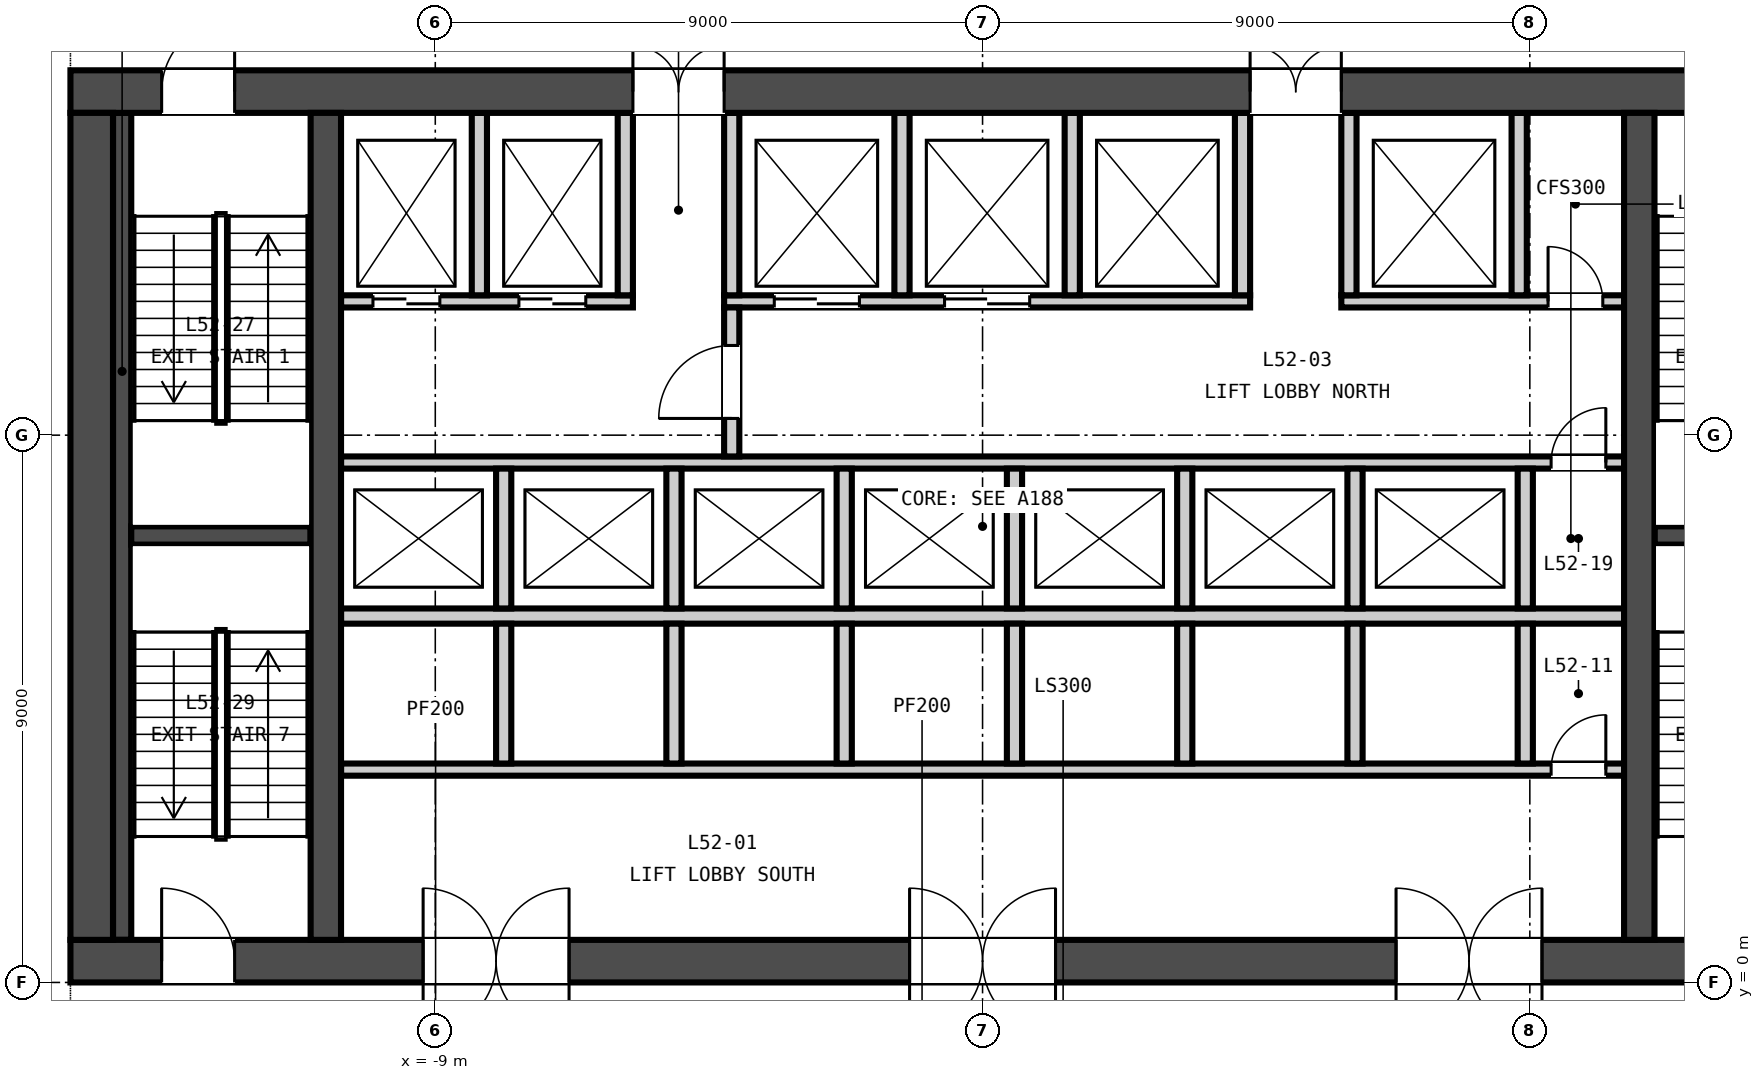
"""IFC4 building model, lengths in metres.
Left out: names, types, materials, properties, quantities, classifications, styles, units other than length and angle.
Written with IfcOpenShell. Run it as: python <this file> out.ifc"""

import sys

from ifc_helpers import new_model, si_unit, direction, frame, frame_2d, origin, place, context, subcontext, project, spatial, rectangle, extrude, element, fill, save


model = new_model("IFC4")
c1 = context("Model", 3, precision=1e-05, world=origin(), true_north=direction((0.0, 1.0)))
c2 = subcontext(c1, "Body", "Model", "MODEL_VIEW")
j1 = project(units=[si_unit("LENGTHUNIT", "METRE"), si_unit("PLANEANGLEUNIT", "RADIAN")], contexts=[c1])
p1 = place(None, origin())
s1 = spatial("IfcSite", under=j1, at=p1, CompositionType="ELEMENT")
p2 = place(p1, origin())
s2 = spatial("IfcBuilding", under=s1, at=p2, CompositionType="ELEMENT")
p3 = place(p2, frame((0.0, 0.0, 207.3)))
s3 = spatial("IfcBuildingStorey", under=s2, at=p3, CompositionType="ELEMENT", Elevation=207.3)
p4 = place(p3, frame((-15.0, 0.35, -0.3), z_axis=(0.0, 0.0, 1.0), x_axis=(1.0, 0.0, 0.0)))
e1 = element("IfcWall", 1, at=p4, inside=s3, PredefinedType="SOLIDWALL", context=c2, shape_type="SweptSolid", body=[
    extrude(rectangle(XDim=30.0, YDim=0.7, at=frame_2d((15.0, 0.0))), origin(), (0.0, 0.0, 1.0), 4.5),
])
p5 = place(p4, frame((5.8, 0.0, 0.3)))
e2 = element("IfcOpeningElement", 2, at=p5, cuts=e1, PredefinedType="OPENING", context=c2, shape_type="SweptSolid", body=[
    extrude(rectangle(XDim=2.4, YDim=2.4, at=frame_2d((1.2, 1.2))), frame((0.0, 0.36, 0.0), z_axis=(0.0, -1.0, 0.0), x_axis=(1.0, 0.0, 0.0)), (0.0, 0.0, 1.0), 0.72),
])
p6 = place(p4, frame((13.8, 0.0, 0.3)))
e3 = element("IfcOpeningElement", 3, at=p6, cuts=e1, PredefinedType="OPENING", context=c2, shape_type="SweptSolid", body=[
    extrude(rectangle(XDim=2.4, YDim=2.4, at=frame_2d((1.2, 1.2))), frame((0.0, 0.36, 0.0), z_axis=(0.0, -1.0, 0.0), x_axis=(1.0, 0.0, 0.0)), (0.0, 0.0, 1.0), 0.72),
])
p7 = place(p4, frame((21.8, 0.0, 0.3)))
e4 = element("IfcOpeningElement", 4, at=p7, cuts=e1, PredefinedType="OPENING", context=c2, shape_type="SweptSolid", body=[
    extrude(rectangle(XDim=2.4, YDim=2.4, at=frame_2d((1.2, 1.2))), frame((0.0, 0.36, 0.0), z_axis=(0.0, -1.0, 0.0), x_axis=(1.0, 0.0, 0.0)), (0.0, 0.0, 1.0), 0.72),
])
p8 = place(p4, frame((1.5, 0.0, 0.3)))
e5 = element("IfcOpeningElement", 5, at=p8, cuts=e1, PredefinedType="OPENING", context=c2, shape_type="SweptSolid", body=[
    extrude(rectangle(XDim=1.2, YDim=2.1, at=frame_2d((0.6, 1.05))), frame((0.0, 0.36, 0.0), z_axis=(0.0, -1.0, 0.0), x_axis=(1.0, 0.0, 0.0)), (0.0, 0.0, 1.0), 0.72),
])
p9 = place(p4, frame((27.3, 0.0, 0.3)))
e6 = element("IfcOpeningElement", 6, at=p9, cuts=e1, PredefinedType="OPENING", context=c2, shape_type="SweptSolid", body=[
    extrude(rectangle(XDim=1.2, YDim=2.1, at=frame_2d((0.6, 1.05))), frame((0.0, 0.36, 0.0), z_axis=(0.0, -1.0, 0.0), x_axis=(1.0, 0.0, 0.0)), (0.0, 0.0, 1.0), 0.72),
])
p10 = place(p3, frame((-15.0, 14.65, -0.3), z_axis=(0.0, 0.0, 1.0), x_axis=(1.0, 0.0, 0.0)))
e7 = element("IfcWall", 7, at=p10, inside=s3, PredefinedType="SOLIDWALL", context=c2, shape_type="SweptSolid", body=[
    extrude(rectangle(XDim=30.0, YDim=0.7, at=frame_2d((15.0, 0.0))), origin(), (0.0, 0.0, 1.0), 4.5),
])
p11 = place(p10, frame((9.25, 0.0, 0.3)))
e8 = element("IfcOpeningElement", 8, at=p11, cuts=e7, PredefinedType="OPENING", context=c2, shape_type="SweptSolid", body=[
    extrude(rectangle(XDim=1.5, YDim=2.1, at=frame_2d((0.75, 1.05))), frame((0.0, 0.36, 0.0), z_axis=(0.0, -1.0, 0.0), x_axis=(1.0, 0.0, 0.0)), (0.0, 0.0, 1.0), 0.72),
])
p12 = place(p10, frame((19.4, 0.0, 0.3)))
e9 = element("IfcOpeningElement", 9, at=p12, cuts=e7, PredefinedType="OPENING", context=c2, shape_type="SweptSolid", body=[
    extrude(rectangle(XDim=1.5, YDim=2.1, at=frame_2d((0.75, 1.05))), frame((0.0, 0.36, 0.0), z_axis=(0.0, -1.0, 0.0), x_axis=(1.0, 0.0, 0.0)), (0.0, 0.0, 1.0), 0.72),
])
p13 = place(p10, frame((1.5, 0.0, 0.3)))
e10 = element("IfcOpeningElement", 10, at=p13, cuts=e7, PredefinedType="OPENING", context=c2, shape_type="SweptSolid", body=[
    extrude(rectangle(XDim=1.2, YDim=2.1, at=frame_2d((0.6, 1.05))), frame((0.0, 0.36, 0.0), z_axis=(0.0, -1.0, 0.0), x_axis=(1.0, 0.0, 0.0)), (0.0, 0.0, 1.0), 0.72),
])
p14 = place(p10, frame((27.3, 0.0, 0.3)))
e11 = element("IfcOpeningElement", 11, at=p14, cuts=e7, PredefinedType="OPENING", context=c2, shape_type="SweptSolid", body=[
    extrude(rectangle(XDim=1.2, YDim=2.1, at=frame_2d((0.6, 1.05))), frame((0.0, 0.36, 0.0), z_axis=(0.0, -1.0, 0.0), x_axis=(1.0, 0.0, 0.0)), (0.0, 0.0, 1.0), 0.72),
])
p15 = place(p3, frame((-14.65, 0.7, -0.3), z_axis=(0.0, 0.0, 1.0), x_axis=(0.0, 1.0, 0.0)))
e12 = element("IfcWall", 12, at=p15, inside=s3, PredefinedType="SOLIDWALL", context=c2, shape_type="SweptSolid", body=[
    extrude(rectangle(XDim=13.6, YDim=0.7, at=frame_2d((6.8, 0.0))), origin(), (0.0, 0.0, 1.0), 4.5),
])
for number, where, z_axis, x_axis in (
    (13, (-10.8, 0.7, -0.3), (0.0, 0.0, 1.0), (0.0, 1.0, 0.0)),
    (14, (10.8, 0.7, -0.3), (0.0, 0.0, 1.0), (0.0, 1.0, 0.0)),
):
    element("IfcWall", number, at=place(p3, frame(where, z_axis=z_axis, x_axis=x_axis)), inside=s3, PredefinedType="SOLIDWALL", context=c2, shape_type="SweptSolid", body=[
        extrude(rectangle(XDim=13.6, YDim=0.5, at=frame_2d((6.8, 0.0))), origin(), (0.0, 0.0, 1.0), 4.5),
    ])
p16 = place(p3, frame((-10.55, 3.5, 0.0), z_axis=(0.0, 0.0, 1.0), x_axis=(1.0, 0.0, 0.0)))
e15 = element("IfcWall", 15, at=p16, inside=s3, PredefinedType="PARTITIONING", context=c2, shape_type="SweptSolid", body=[
    extrude(rectangle(XDim=21.1, YDim=0.2, at=frame_2d((10.55, 0.0))), origin(), (0.0, 0.0, 1.0), 4.2),
])
p17 = place(p16, frame((19.9, 0.0, 0.0)))
e16 = element("IfcOpeningElement", 16, at=p17, cuts=e15, PredefinedType="OPENING", context=c2, shape_type="SweptSolid", body=[
    extrude(rectangle(XDim=0.9, YDim=2.1, at=frame_2d((0.45, 1.05))), frame((0.0, 0.11, 0.0), z_axis=(0.0, -1.0, 0.0), x_axis=(1.0, 0.0, 0.0)), (0.0, 0.0, 1.0), 0.22),
])
p18 = place(p3, frame((-10.55, 6.025, 0.0), z_axis=(0.0, 0.0, 1.0), x_axis=(1.0, 0.0, 0.0)))
e17 = element("IfcWall", 17, at=p18, inside=s3, PredefinedType="PARTITIONING", context=c2, shape_type="SweptSolid", body=[
    extrude(rectangle(XDim=21.1, YDim=0.25, at=frame_2d((10.55, 0.0))), origin(), (0.0, 0.0, 1.0), 4.2),
])
p19 = place(p3, frame((-10.55, 8.55, 0.0), z_axis=(0.0, 0.0, 1.0), x_axis=(1.0, 0.0, 0.0)))
e18 = element("IfcWall", 18, at=p19, inside=s3, PredefinedType="PARTITIONING", context=c2, shape_type="SweptSolid", body=[
    extrude(rectangle(XDim=21.1, YDim=0.2, at=frame_2d((10.55, 0.0))), origin(), (0.0, 0.0, 1.0), 4.2),
])
p20 = place(p19, frame((19.9, 0.0, 0.0)))
e19 = element("IfcOpeningElement", 19, at=p20, cuts=e18, PredefinedType="OPENING", context=c2, shape_type="SweptSolid", body=[
    extrude(rectangle(XDim=0.9, YDim=2.1, at=frame_2d((0.45, 1.05))), frame((0.0, 0.11, 0.0), z_axis=(0.0, -1.0, 0.0), x_axis=(1.0, 0.0, 0.0)), (0.0, 0.0, 1.0), 0.22),
])
p21 = place(p3, frame((-10.55, 11.2, 0.0), z_axis=(0.0, 0.0, 1.0), x_axis=(1.0, 0.0, 0.0)))
e20 = element("IfcWall", 20, at=p21, inside=s3, PredefinedType="PARTITIONING", context=c2, shape_type="SweptSolid", body=[
    extrude(rectangle(XDim=4.8, YDim=0.2, at=frame_2d((2.4, 0.0))), origin(), (0.0, 0.0, 1.0), 4.2),
])
p22 = place(p21, frame((0.525, 0.0, 0.0)))
e21 = element("IfcOpeningElement", 21, at=p22, cuts=e20, PredefinedType="OPENING", context=c2, shape_type="SweptSolid", body=[
    extrude(rectangle(XDim=1.1, YDim=2.1, at=frame_2d((0.55, 1.05))), frame((0.0, 0.11, 0.0), z_axis=(0.0, -1.0, 0.0), x_axis=(1.0, 0.0, 0.0)), (0.0, 0.0, 1.0), 0.22),
])
p23 = place(p21, frame((2.925, 0.0, 0.0)))
e22 = element("IfcOpeningElement", 22, at=p23, cuts=e20, PredefinedType="OPENING", context=c2, shape_type="SweptSolid", body=[
    extrude(rectangle(XDim=1.1, YDim=2.1, at=frame_2d((0.55, 1.05))), frame((0.0, 0.11, 0.0), z_axis=(0.0, -1.0, 0.0), x_axis=(1.0, 0.0, 0.0)), (0.0, 0.0, 1.0), 0.22),
])
p24 = place(p3, frame((-4.25, 11.2, 0.0), z_axis=(0.0, 0.0, 1.0), x_axis=(1.0, 0.0, 0.0)))
e23 = element("IfcWall", 23, at=p24, inside=s3, PredefinedType="PARTITIONING", context=c2, shape_type="SweptSolid", body=[
    extrude(rectangle(XDim=8.65, YDim=0.2, at=frame_2d((4.325, 0.0))), origin(), (0.0, 0.0, 1.0), 4.2),
])
p25 = place(p24, frame((0.825, 0.0, 0.0)))
e24 = element("IfcOpeningElement", 24, at=p25, cuts=e23, PredefinedType="OPENING", context=c2, shape_type="SweptSolid", body=[
    extrude(rectangle(XDim=1.4, YDim=2.1, at=frame_2d((0.7, 1.05))), frame((0.0, 0.11, 0.0), z_axis=(0.0, -1.0, 0.0), x_axis=(1.0, 0.0, 0.0)), (0.0, 0.0, 1.0), 0.22),
])
p26 = place(p24, frame((3.625, 0.0, 0.0)))
e25 = element("IfcOpeningElement", 25, at=p26, cuts=e23, PredefinedType="OPENING", context=c2, shape_type="SweptSolid", body=[
    extrude(rectangle(XDim=1.4, YDim=2.1, at=frame_2d((0.7, 1.05))), frame((0.0, 0.11, 0.0), z_axis=(0.0, -1.0, 0.0), x_axis=(1.0, 0.0, 0.0)), (0.0, 0.0, 1.0), 0.22),
])
p27 = place(p3, frame((5.9, 11.2, 0.0), z_axis=(0.0, 0.0, 1.0), x_axis=(1.0, 0.0, 0.0)))
e26 = element("IfcWall", 26, at=p27, inside=s3, PredefinedType="PARTITIONING", context=c2, shape_type="SweptSolid", body=[
    extrude(rectangle(XDim=4.65, YDim=0.2, at=frame_2d((2.325, 0.0))), origin(), (0.0, 0.0, 1.0), 4.2),
])
p28 = place(p27, frame((3.4, 0.0, 0.0)))
e27 = element("IfcOpeningElement", 27, at=p28, cuts=e26, PredefinedType="OPENING", context=c2, shape_type="SweptSolid", body=[
    extrude(rectangle(XDim=0.9, YDim=2.1, at=frame_2d((0.45, 1.05))), frame((0.0, 0.11, 0.0), z_axis=(0.0, -1.0, 0.0), x_axis=(1.0, 0.0, 0.0)), (0.0, 0.0, 1.0), 0.22),
])
p29 = place(p3, frame((-4.125, 8.65, 0.0), z_axis=(0.0, 0.0, 1.0), x_axis=(0.0, 1.0, 0.0)))
e28 = element("IfcWall", 28, at=p29, inside=s3, PredefinedType="PARTITIONING", context=c2, shape_type="SweptSolid", body=[
    extrude(rectangle(XDim=2.45, YDim=0.25, at=frame_2d((1.225, 0.0))), origin(), (0.0, 0.0, 1.0), 4.2),
])
p30 = place(p29, frame((0.625, 0.0, 0.0)))
e29 = element("IfcOpeningElement", 29, at=p30, cuts=e28, PredefinedType="OPENING", context=c2, shape_type="SweptSolid", body=[
    extrude(rectangle(XDim=1.2, YDim=2.1, at=frame_2d((0.6, 1.05))), frame((0.0, 0.135, 0.0), z_axis=(0.0, -1.0, 0.0), x_axis=(1.0, 0.0, 0.0)), (0.0, 0.0, 1.0), 0.27),
])
for number, where, z_axis, x_axis in (
    (30, (-7.875, 3.6, 0.0), (0.0, 0.0, 1.0), (0.0, 1.0, 0.0)),
    (31, (-5.075, 3.6, 0.0), (0.0, 0.0, 1.0), (0.0, 1.0, 0.0)),
    (32, (-2.275, 3.6, 0.0), (0.0, 0.0, 1.0), (0.0, 1.0, 0.0)),
    (33, (0.525, 3.6, 0.0), (0.0, 0.0, 1.0), (0.0, 1.0, 0.0)),
    (34, (3.325, 3.6, 0.0), (0.0, 0.0, 1.0), (0.0, 1.0, 0.0)),
    (35, (6.125, 3.6, 0.0), (0.0, 0.0, 1.0), (0.0, 1.0, 0.0)),
    (36, (8.925, 3.6, 0.0), (0.0, 0.0, 1.0), (0.0, 1.0, 0.0)),
):
    element("IfcWall", number, at=place(p3, frame(where, z_axis=z_axis, x_axis=x_axis)), inside=s3, PredefinedType="PARTITIONING", context=c2, shape_type="SweptSolid", body=[
        extrude(rectangle(XDim=2.3, YDim=0.25, at=frame_2d((1.15, 0.0))), origin(), (0.0, 0.0, 1.0), 4.2),
    ])
for number, where, z_axis, x_axis in (
    (37, (-7.875, 6.15, 0.0), (0.0, 0.0, 1.0), (0.0, 1.0, 0.0)),
    (38, (-5.075, 6.15, 0.0), (0.0, 0.0, 1.0), (0.0, 1.0, 0.0)),
    (39, (-2.275, 6.15, 0.0), (0.0, 0.0, 1.0), (0.0, 1.0, 0.0)),
    (40, (0.525, 6.15, 0.0), (0.0, 0.0, 1.0), (0.0, 1.0, 0.0)),
    (41, (3.325, 6.15, 0.0), (0.0, 0.0, 1.0), (0.0, 1.0, 0.0)),
    (42, (6.125, 6.15, 0.0), (0.0, 0.0, 1.0), (0.0, 1.0, 0.0)),
    (43, (8.925, 6.15, 0.0), (0.0, 0.0, 1.0), (0.0, 1.0, 0.0)),
):
    element("IfcWall", number, at=place(p3, frame(where, z_axis=z_axis, x_axis=x_axis)), inside=s3, PredefinedType="PARTITIONING", context=c2, shape_type="SweptSolid", body=[
        extrude(rectangle(XDim=2.3, YDim=0.25, at=frame_2d((1.15, 0.0))), origin(), (0.0, 0.0, 1.0), 4.2),
    ])
for number, where, z_axis, x_axis in (
    (44, (-8.275, 11.3, 0.0), (0.0, 0.0, 1.0), (0.0, 1.0, 0.0)),
    (45, (-5.875, 11.3, 0.0), (0.0, 0.0, 1.0), (0.0, 1.0, 0.0)),
    (46, (-4.125, 11.3, 0.0), (0.0, 0.0, 1.0), (0.0, 1.0, 0.0)),
    (47, (-1.325, 11.3, 0.0), (0.0, 0.0, 1.0), (0.0, 1.0, 0.0)),
    (48, (1.475, 11.3, 0.0), (0.0, 0.0, 1.0), (0.0, 1.0, 0.0)),
    (49, (4.275, 11.3, 0.0), (0.0, 0.0, 1.0), (0.0, 1.0, 0.0)),
    (50, (6.025, 11.3, 0.0), (0.0, 0.0, 1.0), (0.0, 1.0, 0.0)),
    (51, (8.825, 11.3, 0.0), (0.0, 0.0, 1.0), (0.0, 1.0, 0.0)),
):
    element("IfcWall", number, at=place(p3, frame(where, z_axis=z_axis, x_axis=x_axis)), inside=s3, PredefinedType="PARTITIONING", context=c2, shape_type="SweptSolid", body=[
        extrude(rectangle(XDim=3.0, YDim=0.25, at=frame_2d((1.5, 0.0))), origin(), (0.0, 0.0, 1.0), 4.2),
    ])
p31 = place(p3, frame((-14.0, 7.35, 0.0), z_axis=(0.0, 0.0, 1.0), x_axis=(1.0, 0.0, 0.0)))
e52 = element("IfcWall", 52, at=p31, inside=s3, PredefinedType="SOLIDWALL", context=c2, shape_type="SweptSolid", body=[
    extrude(rectangle(XDim=2.95, YDim=0.3, at=frame_2d((1.475, 0.0))), origin(), (0.0, 0.0, 1.0), 4.2),
])
p32 = place(p3, frame((-14.15, 0.7, 0.0), z_axis=(0.0, 0.0, 1.0), x_axis=(0.0, 1.0, 0.0)))
e53 = element("IfcWall", 53, at=p32, inside=s3, PredefinedType="SOLIDWALL", context=c2, shape_type="SweptSolid", body=[
    extrude(rectangle(XDim=13.6, YDim=0.3, at=frame_2d((6.8, 0.0))), origin(), (0.0, 0.0, 1.0), 4.2),
])
p33 = place(p3, frame((11.05, 7.35, 0.0), z_axis=(0.0, 0.0, 1.0), x_axis=(1.0, 0.0, 0.0)))
e54 = element("IfcWall", 54, at=p33, inside=s3, PredefinedType="SOLIDWALL", context=c2, shape_type="SweptSolid", body=[
    extrude(rectangle(XDim=2.95, YDim=0.3, at=frame_2d((1.475, 0.0))), origin(), (0.0, 0.0, 1.0), 4.2),
])
p34 = place(p3, frame((10.863, 22.964, 0.0), z_axis=(0.0, 0.0, 1.0), x_axis=(0.669131375447, -0.743144132987, 0.0)))
e55 = element("IfcWall", 55, at=p34, inside=s3, PredefinedType="PARTITIONING", context=c2, shape_type="SweptSolid", body=[
    extrude(rectangle(XDim=27.355, YDim=0.2, at=frame_2d((13.678, 0.0))), origin(), (0.0, 0.0, 1.0), 4.2),
])
p35 = place(p30, origin())
e56 = element("IfcDoor", 56, at=p35, inside=s3, OperationType="SINGLE_SWING_LEFT", PredefinedType="DOOR", context=c2, shape_type="SweptSolid", body=[
    extrude(rectangle(XDim=1.2, YDim=2.1, at=frame_2d((0.6, 1.05))), frame((0.0, 0.025, 0.0), z_axis=(0.0, -1.0, 0.0), x_axis=(1.0, 0.0, 0.0)), (0.0, 0.0, 1.0), 0.05),
])
fill(e29, e56)
p36 = place(p17, origin())
e57 = element("IfcDoor", 57, at=p36, inside=s3, OperationType="SINGLE_SWING_RIGHT", PredefinedType="DOOR", context=c2, shape_type="SweptSolid", body=[
    extrude(rectangle(XDim=0.9, YDim=2.1, at=frame_2d((0.45, 1.05))), frame((0.0, 0.025, 0.0), z_axis=(0.0, -1.0, 0.0), x_axis=(1.0, 0.0, 0.0)), (0.0, 0.0, 1.0), 0.05),
])
fill(e16, e57)
p37 = place(p20, origin())
e58 = element("IfcDoor", 58, at=p37, inside=s3, OperationType="SINGLE_SWING_RIGHT", PredefinedType="DOOR", context=c2, shape_type="SweptSolid", body=[
    extrude(rectangle(XDim=0.9, YDim=2.1, at=frame_2d((0.45, 1.05))), frame((0.0, 0.025, 0.0), z_axis=(0.0, -1.0, 0.0), x_axis=(1.0, 0.0, 0.0)), (0.0, 0.0, 1.0), 0.05),
])
fill(e19, e58)
p38 = place(p22, origin())
e59 = element("IfcDoor", 59, at=p38, inside=s3, OperationType="DOUBLE_DOOR_SLIDING", PredefinedType="DOOR", context=c2, shape_type="SweptSolid", body=[
    extrude(rectangle(XDim=1.1, YDim=2.1, at=frame_2d((0.55, 1.05))), frame((0.0, 0.025, 0.0), z_axis=(0.0, -1.0, 0.0), x_axis=(1.0, 0.0, 0.0)), (0.0, 0.0, 1.0), 0.05),
])
fill(e21, e59)
p39 = place(p23, origin())
e60 = element("IfcDoor", 60, at=p39, inside=s3, OperationType="DOUBLE_DOOR_SLIDING", PredefinedType="DOOR", context=c2, shape_type="SweptSolid", body=[
    extrude(rectangle(XDim=1.1, YDim=2.1, at=frame_2d((0.55, 1.05))), frame((0.0, 0.025, 0.0), z_axis=(0.0, -1.0, 0.0), x_axis=(1.0, 0.0, 0.0)), (0.0, 0.0, 1.0), 0.05),
])
fill(e22, e60)
p40 = place(p25, origin())
e61 = element("IfcDoor", 61, at=p40, inside=s3, OperationType="DOUBLE_DOOR_SLIDING", PredefinedType="DOOR", context=c2, shape_type="SweptSolid", body=[
    extrude(rectangle(XDim=1.4, YDim=2.1, at=frame_2d((0.7, 1.05))), frame((0.0, 0.025, 0.0), z_axis=(0.0, -1.0, 0.0), x_axis=(1.0, 0.0, 0.0)), (0.0, 0.0, 1.0), 0.05),
])
fill(e24, e61)
p41 = place(p26, origin())
e62 = element("IfcDoor", 62, at=p41, inside=s3, OperationType="DOUBLE_DOOR_SLIDING", PredefinedType="DOOR", context=c2, shape_type="SweptSolid", body=[
    extrude(rectangle(XDim=1.4, YDim=2.1, at=frame_2d((0.7, 1.05))), frame((0.0, 0.025, 0.0), z_axis=(0.0, -1.0, 0.0), x_axis=(1.0, 0.0, 0.0)), (0.0, 0.0, 1.0), 0.05),
])
fill(e25, e62)
p42 = place(p28, origin())
e63 = element("IfcDoor", 63, at=p42, inside=s3, OperationType="SINGLE_SWING_LEFT", PredefinedType="DOOR", context=c2, shape_type="SweptSolid", body=[
    extrude(rectangle(XDim=0.9, YDim=2.1, at=frame_2d((0.45, 1.05))), frame((0.0, 0.025, 0.0), z_axis=(0.0, -1.0, 0.0), x_axis=(1.0, 0.0, 0.0)), (0.0, 0.0, 1.0), 0.05),
])
fill(e27, e63)
p43 = place(p5, origin())
e64 = element("IfcDoor", 64, at=p43, inside=s3, OperationType="DOUBLE_DOOR_DOUBLE_SWING", PredefinedType="DOOR", context=c2, shape_type="SweptSolid", body=[
    extrude(rectangle(XDim=2.4, YDim=2.4, at=frame_2d((1.2, 1.2))), frame((0.0, 0.025, 0.0), z_axis=(0.0, -1.0, 0.0), x_axis=(1.0, 0.0, 0.0)), (0.0, 0.0, 1.0), 0.05),
])
fill(e2, e64)
p44 = place(p6, origin())
e65 = element("IfcDoor", 65, at=p44, inside=s3, OperationType="DOUBLE_DOOR_DOUBLE_SWING", PredefinedType="DOOR", context=c2, shape_type="SweptSolid", body=[
    extrude(rectangle(XDim=2.4, YDim=2.4, at=frame_2d((1.2, 1.2))), frame((0.0, 0.025, 0.0), z_axis=(0.0, -1.0, 0.0), x_axis=(1.0, 0.0, 0.0)), (0.0, 0.0, 1.0), 0.05),
])
fill(e3, e65)
p45 = place(p7, origin())
e66 = element("IfcDoor", 66, at=p45, inside=s3, OperationType="DOUBLE_DOOR_DOUBLE_SWING", PredefinedType="DOOR", context=c2, shape_type="SweptSolid", body=[
    extrude(rectangle(XDim=2.4, YDim=2.4, at=frame_2d((1.2, 1.2))), frame((0.0, 0.025, 0.0), z_axis=(0.0, -1.0, 0.0), x_axis=(1.0, 0.0, 0.0)), (0.0, 0.0, 1.0), 0.05),
])
fill(e4, e66)
p46 = place(p11, origin())
e67 = element("IfcDoor", 67, at=p46, inside=s3, OperationType="DOUBLE_DOOR_SINGLE_SWING", PredefinedType="DOOR", context=c2, shape_type="SweptSolid", body=[
    extrude(rectangle(XDim=1.5, YDim=2.1, at=frame_2d((0.75, 1.05))), frame((0.0, 0.025, 0.0), z_axis=(0.0, -1.0, 0.0), x_axis=(1.0, 0.0, 0.0)), (0.0, 0.0, 1.0), 0.05),
])
fill(e8, e67)
p47 = place(p12, origin())
e68 = element("IfcDoor", 68, at=p47, inside=s3, OperationType="DOUBLE_DOOR_SINGLE_SWING", PredefinedType="DOOR", context=c2, shape_type="SweptSolid", body=[
    extrude(rectangle(XDim=1.5, YDim=2.1, at=frame_2d((0.75, 1.05))), frame((0.0, 0.025, 0.0), z_axis=(0.0, -1.0, 0.0), x_axis=(1.0, 0.0, 0.0)), (0.0, 0.0, 1.0), 0.05),
])
fill(e9, e68)
p48 = place(p13, origin())
e69 = element("IfcDoor", 69, at=p48, inside=s3, OperationType="SINGLE_SWING_RIGHT", PredefinedType="DOOR", context=c2, shape_type="SweptSolid", body=[
    extrude(rectangle(XDim=1.2, YDim=2.1, at=frame_2d((0.6, 1.05))), frame((0.0, 0.025, 0.0), z_axis=(0.0, -1.0, 0.0), x_axis=(1.0, 0.0, 0.0)), (0.0, 0.0, 1.0), 0.05),
])
fill(e10, e69)
p49 = place(p8, origin())
e70 = element("IfcDoor", 70, at=p49, inside=s3, OperationType="SINGLE_SWING_LEFT", PredefinedType="DOOR", context=c2, shape_type="SweptSolid", body=[
    extrude(rectangle(XDim=1.2, YDim=2.1, at=frame_2d((0.6, 1.05))), frame((0.0, 0.025, 0.0), z_axis=(0.0, -1.0, 0.0), x_axis=(1.0, 0.0, 0.0)), (0.0, 0.0, 1.0), 0.05),
])
fill(e5, e70)
save(model, sys.argv[1])
